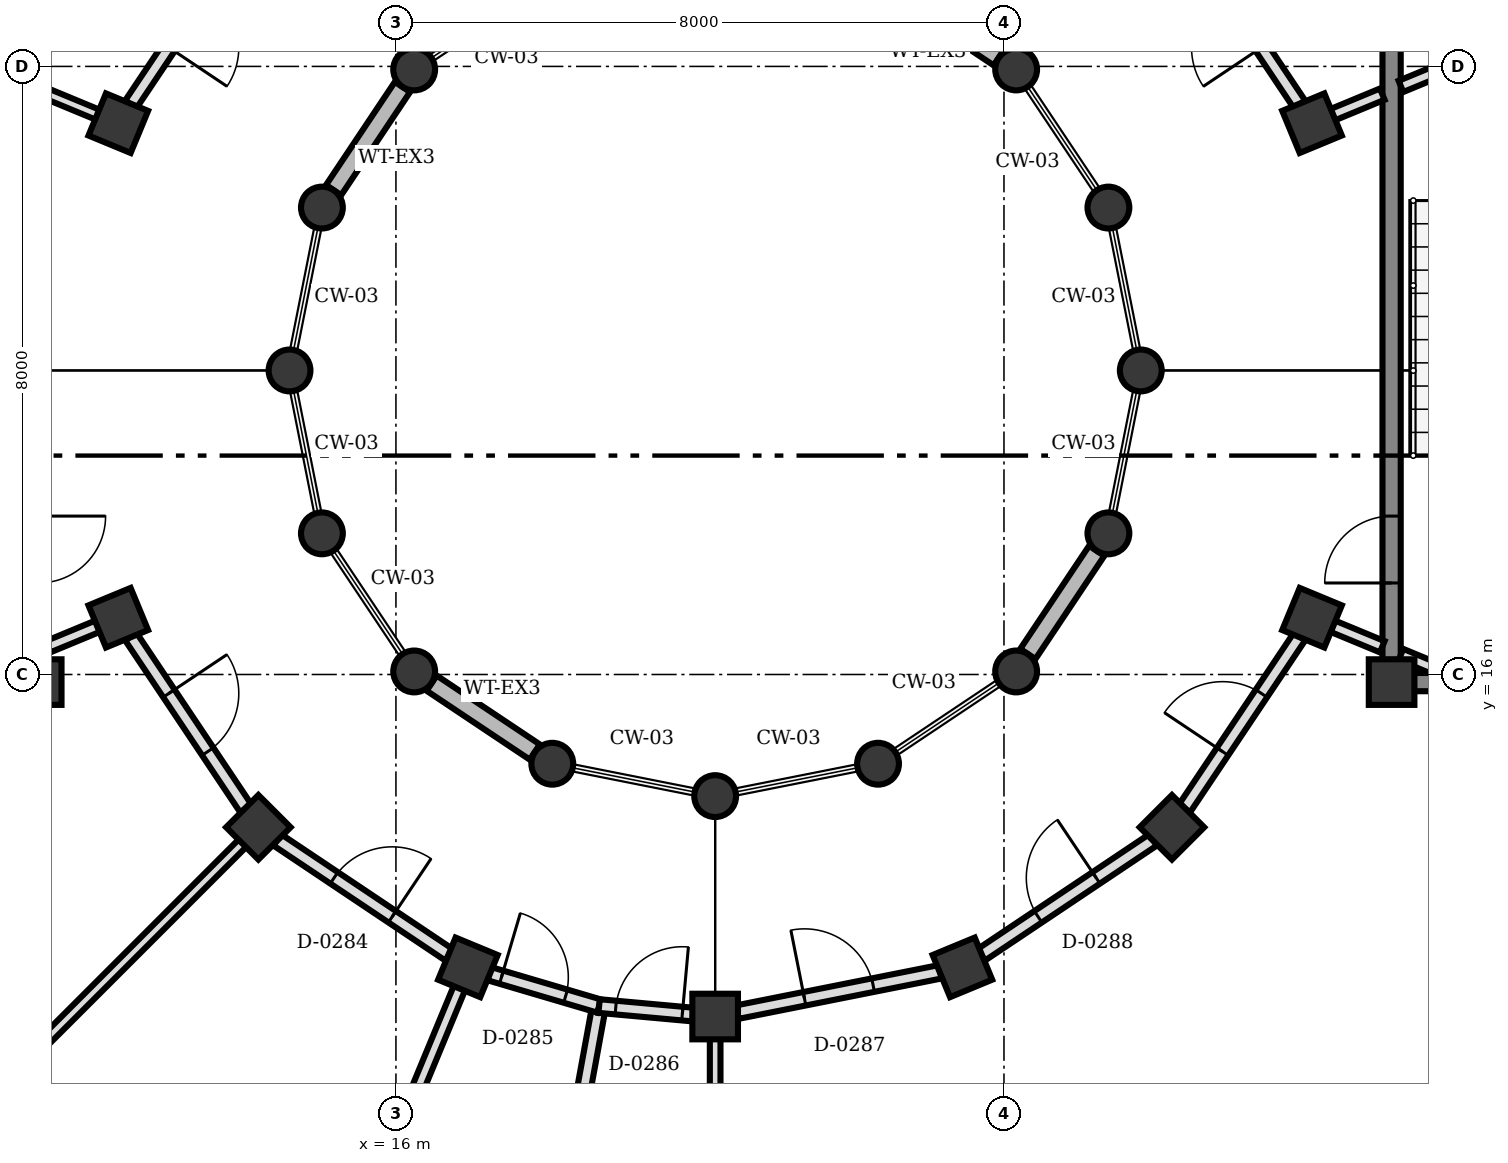
"""IFC4 building model, lengths in metres.
Left out: names, types, materials, properties, quantities, classifications, styles, units other than length and angle.
Written with IfcOpenShell. Run it as: python <this file> out.ifc"""

import sys

from ifc_helpers import new_model, si_unit, direction, frame, frame_2d, origin, origin_2d, place, context, subcontext, project, spatial, rectangle, circle, extrude, element, fill, save


model = new_model("IFC4")
c1 = context("Model", 3, precision=1e-05, world=origin(), true_north=direction((0.0, 1.0)))
c2 = subcontext(c1, "Body", "Model", "MODEL_VIEW")
j1 = project(units=[si_unit("LENGTHUNIT", "METRE"), si_unit("PLANEANGLEUNIT", "RADIAN")], contexts=[c1])
p1 = place(None, origin())
s1 = spatial("IfcSite", under=j1, at=p1, CompositionType="ELEMENT")
p2 = place(p1, origin())
s2 = spatial("IfcBuilding", under=s1, at=p2, CompositionType="ELEMENT")
p3 = place(p2, origin())
s3 = spatial("IfcBuildingStorey", under=s2, at=p3, CompositionType="ELEMENT", Elevation=0.0)
for number, where, z_axis, x_axis in (
    (1, (11.3, 15.9, 0.0), (0.0, 0.0, 1.0), (1.0, 0.0, 0.0)),
    (2, (29.1, 15.9, 0.0), (0.0, 0.0, 1.0), (1.0, 0.0, 0.0)),
):
    element("IfcColumn", number, at=place(p3, frame(where, z_axis=z_axis, x_axis=x_axis)), inside=s3, PredefinedType="COLUMN", context=c2, shape_type="SweptSolid", body=[
        extrude(rectangle(XDim=0.6, YDim=0.6, at=origin_2d()), origin(), (0.0, 0.0, 1.0), 4.5),
    ])
for number, where, z_axis, x_axis in (
    (3, (25.8, 20.0, 0.0), (0.0, 0.0, 1.0), (1.0, 0.0, 0.0)),
    (4, (25.374, 22.143, 0.0), (0.0, 0.0, 1.0), (1.0, 0.0, 0.0)),
    (5, (24.16, 23.96, 0.0), (0.0, 0.0, 1.0), (1.0, 0.0, 0.0)),
    (6, (16.24, 23.96, 0.0), (0.0, 0.0, 1.0), (1.0, 0.0, 0.0)),
    (7, (15.026, 22.143, 0.0), (0.0, 0.0, 1.0), (1.0, 0.0, 0.0)),
    (8, (14.6, 20.0, 0.0), (0.0, 0.0, 1.0), (1.0, 0.0, 0.0)),
    (9, (15.026, 17.857, 0.0), (0.0, 0.0, 1.0), (1.0, 0.0, 0.0)),
    (10, (16.24, 16.04, 0.0), (0.0, 0.0, 1.0), (1.0, 0.0, 0.0)),
    (11, (18.057, 14.826, 0.0), (0.0, 0.0, 1.0), (1.0, 0.0, 0.0)),
    (12, (20.2, 14.4, 0.0), (0.0, 0.0, 1.0), (1.0, 0.0, 0.0)),
    (13, (22.343, 14.826, 0.0), (0.0, 0.0, 1.0), (1.0, 0.0, 0.0)),
    (14, (24.16, 16.04, 0.0), (0.0, 0.0, 1.0), (1.0, 0.0, 0.0)),
    (15, (25.374, 17.857, 0.0), (0.0, 0.0, 1.0), (1.0, 0.0, 0.0)),
):
    element("IfcColumn", number, at=place(p3, frame(where, z_axis=z_axis, x_axis=x_axis)), inside=s3, PredefinedType="COLUMN", context=c2, shape_type="SweptSolid", body=[
        extrude(circle(Radius=0.275, at=origin_2d()), origin(), (0.0, 0.0, 1.0), 4.5),
    ])
for number, where, z_axis, x_axis in (
    (16, (28.053, 23.253, 0.0), (0.0, 0.0, 1.0), (0.924, 0.383, 0.0)),
    (17, (12.347, 23.253, 0.0), (0.0, 0.0, 1.0), (-0.924, 0.383, 0.0)),
    (18, (12.347, 16.747, 0.0), (0.0, 0.0, 1.0), (-0.924, -0.383, 0.0)),
    (19, (14.19, 13.99, 0.0), (0.0, 0.0, 1.0), (-0.707, -0.707, 0.0)),
    (20, (16.947, 12.147, 0.0), (0.0, 0.0, 1.0), (-0.383, -0.924, 0.0)),
    (21, (20.2, 11.5, 0.0), (0.0, 0.0, 1.0), (0.0, -1.0, 0.0)),
    (22, (23.453, 12.147, 0.0), (0.0, 0.0, 1.0), (0.383, -0.924, 0.0)),
    (23, (26.21, 13.99, 0.0), (0.0, 0.0, 1.0), (0.707, -0.707, 0.0)),
    (24, (28.053, 16.747, 0.0), (0.0, 0.0, 1.0), (0.924, -0.383, 0.0)),
):
    element("IfcColumn", number, at=place(p3, frame(where, z_axis=z_axis, x_axis=x_axis)), inside=s3, PredefinedType="COLUMN", context=c2, shape_type="SweptSolid", body=[
        extrude(rectangle(XDim=0.6, YDim=0.6, at=origin_2d()), origin(), (0.0, 0.0, 1.0), 4.5),
    ])
for number, where, z_axis, x_axis in (
    (25, (23.93, 24.114, 0.0), (0.0, 0.0, 1.0), (-0.832, 0.555, 0.0)),
    (26, (16.086, 23.73, 0.0), (0.0, 0.0, 1.0), (-0.555, -0.832, 0.0)),
    (27, (16.47, 15.886, 0.0), (0.0, 0.0, 1.0), (0.832, -0.555, 0.0)),
    (28, (24.314, 16.27, 0.0), (0.0, 0.0, 1.0), (0.555, 0.832, 0.0)),
):
    element("IfcWall", number, at=place(p3, frame(where, z_axis=z_axis, x_axis=x_axis)), inside=s3, PredefinedType="SOLIDWALL", context=c2, shape_type="SweptSolid", body=[
        extrude(rectangle(XDim=1.632, YDim=0.24, at=frame_2d((0.816, 0.0))), origin(), (0.0, 0.0, 1.0), 3.55),
    ])
p4 = place(p3, frame((29.1, 16.192, 0.0), z_axis=(0.0, 0.0, 1.0), x_axis=(0.0, 1.0, 0.0)))
e29 = element("IfcWall", 29, at=p4, inside=s3, PredefinedType="SHEAR", context=c2, shape_type="SweptSolid", body=[
    extrude(rectangle(XDim=8.136, YDim=0.24, at=frame_2d((4.068, 0.0))), origin(), (0.0, 0.0, 1.0), 4.24),
])
p5 = place(p4, frame((1.012, 0.0, 0.0)))
e30 = element("IfcOpeningElement", 30, at=p5, cuts=e29, PredefinedType="OPENING", context=c2, shape_type="SweptSolid", body=[
    extrude(rectangle(XDim=0.88, YDim=2.1, at=frame_2d((0.44, 1.05))), frame((0.0, 0.13, 0.0), z_axis=(0.0, -1.0, 0.0), x_axis=(1.0, 0.0, 0.0)), (0.0, 0.0, 1.0), 0.26),
])
p6 = place(p3, frame((33.608, 15.9, 0.0), z_axis=(0.0, 0.0, 1.0), x_axis=(-1.0, 0.0, 0.0)))
e31 = element("IfcWall", 31, at=p6, inside=s3, PredefinedType="SHEAR", context=c2, shape_type="SweptSolid", body=[
    extrude(rectangle(XDim=4.216, YDim=0.24, at=frame_2d((2.108, 0.0))), origin(), (0.0, 0.0, 1.0), 4.24),
])
p7 = place(p3, frame((28.323, 23.364, 0.0), z_axis=(0.0, 0.0, 1.0), x_axis=(0.923840285319, 0.382778169729, 0.0)))
e32 = element("IfcWall", 32, at=p7, inside=s3, PredefinedType="PARTITIONING", context=c2, shape_type="SweptSolid", body=[
    extrude(rectangle(XDim=0.708, YDim=0.16, at=frame_2d((0.354, 0.0))), origin(), (0.0, 0.0, 1.0), 4.2),
])
p8 = place(p3, frame((29.223, 23.737, 0.0), z_axis=(0.0, 0.0, 1.0), x_axis=(0.923817443679, 0.382833293686, 0.0)))
e33 = element("IfcWall", 33, at=p8, inside=s3, PredefinedType="PARTITIONING", context=c2, shape_type="SweptSolid", body=[
    extrude(rectangle(XDim=1.985, YDim=0.16, at=frame_2d((0.993, 0.0))), origin(), (0.0, 0.0, 1.0), 4.2),
])
p9 = place(p3, frame((12.077, 23.364, 0.0), z_axis=(0.0, 0.0, 1.0), x_axis=(-0.923789734747, 0.382900151445, 0.0)))
e34 = element("IfcWall", 34, at=p9, inside=s3, PredefinedType="PARTITIONING", context=c2, shape_type="SweptSolid", body=[
    extrude(rectangle(XDim=0.708, YDim=0.14, at=frame_2d((0.354, 0.0))), origin(), (0.0, 0.0, 1.0), 4.2),
])
p10 = place(p3, frame((12.077, 16.636, 0.0), z_axis=(0.0, 0.0, 1.0), x_axis=(-0.923789734747, -0.382900151445, 0.0)))
e35 = element("IfcWall", 35, at=p10, inside=s3, PredefinedType="PARTITIONING", context=c2, shape_type="SweptSolid", body=[
    extrude(rectangle(XDim=0.708, YDim=0.16, at=frame_2d((0.354, 0.0))), origin(), (0.0, 0.0, 1.0), 3.552),
])
p11 = place(p3, frame((13.984, 13.784, 0.0), z_axis=(0.0, 0.0, 1.0), x_axis=(-0.707106781187, -0.707106781187, 0.0)))
e36 = element("IfcWall", 36, at=p11, inside=s3, PredefinedType="PARTITIONING", context=c2, shape_type="SweptSolid", body=[
    extrude(rectangle(XDim=8.392, YDim=0.14, at=frame_2d((4.196, 0.0))), origin(), (0.0, 0.0, 1.0), 3.552),
])
p12 = place(p3, frame((16.836, 11.877, 0.0), z_axis=(0.0, 0.0, 1.0), x_axis=(-0.382780060664, -0.923839501839, 0.0)))
e37 = element("IfcWall", 37, at=p12, inside=s3, PredefinedType="PARTITIONING", context=c2, shape_type="SweptSolid", body=[
    extrude(rectangle(XDim=8.391, YDim=0.16, at=frame_2d((4.196, 0.0))), origin(), (0.0, 0.0, 1.0), 3.552),
])
p13 = place(p3, frame((20.2, 11.208, 0.0), z_axis=(0.0, 0.0, 1.0), x_axis=(0.0, -1.0, 0.0)))
e38 = element("IfcWall", 38, at=p13, inside=s3, PredefinedType="PARTITIONING", context=c2, shape_type="SweptSolid", body=[
    extrude(rectangle(XDim=8.391, YDim=0.14, at=frame_2d((4.196, 0.0))), origin(), (0.0, 0.0, 1.0), 3.552),
])
p14 = place(p3, frame((28.323, 16.636, 0.0), z_axis=(0.0, 0.0, 1.0), x_axis=(0.923840285319, -0.382778169729, 0.0)))
e39 = element("IfcWall", 39, at=p14, inside=s3, PredefinedType="PARTITIONING", context=c2, shape_type="SweptSolid", body=[
    extrude(rectangle(XDim=0.708, YDim=0.16, at=frame_2d((0.354, 0.0))), origin(), (0.0, 0.0, 1.0), 3.552),
])
p15 = place(p3, frame((29.223, 16.263, 0.0), z_axis=(0.0, 0.0, 1.0), x_axis=(0.923812676193, -0.382844797933, 0.0)))
e40 = element("IfcWall", 40, at=p15, inside=s3, PredefinedType="PARTITIONING", context=c2, shape_type="SweptSolid", body=[
    extrude(rectangle(XDim=0.627, YDim=0.16, at=frame_2d((0.313, 0.0))), origin(), (0.0, 0.0, 1.0), 3.552),
])
p16 = place(p3, frame((18.673, 11.638, 0.0), z_axis=(0.0, 0.0, 1.0), x_axis=(-0.179734485707, -0.983715159306, 0.0)))
e41 = element("IfcWall", 41, at=p16, inside=s3, PredefinedType="PARTITIONING", context=c2, shape_type="SweptSolid", body=[
    extrude(rectangle(XDim=8.552, YDim=0.18, at=frame_2d((4.276, 0.0))), origin(), (0.0, 0.0, 1.0), 3.552),
])
p17 = place(p3, frame((27.888, 23.501, 0.0), z_axis=(0.0, 0.0, 1.0), x_axis=(-0.556128339679, 0.831096426298, 0.0)))
e42 = element("IfcWall", 42, at=p17, inside=s3, PredefinedType="PARTITIONING", context=c2, shape_type="SweptSolid", body=[
    extrude(rectangle(XDim=2.72, YDim=0.18, at=frame_2d((1.36, 0.0))), origin(), (0.0, 0.0, 1.0), 3.552),
])
p18 = place(p17, frame((0.9, 0.0, 0.0)))
e43 = element("IfcOpeningElement", 43, at=p18, cuts=e42, PredefinedType="OPENING", context=c2, shape_type="SweptSolid", body=[
    extrude(rectangle(XDim=0.92, YDim=2.1, at=frame_2d((0.46, 1.05))), frame((0.0, 0.1, 0.0), z_axis=(0.0, -1.0, 0.0), x_axis=(1.0, 0.0, 0.0)), (0.0, 0.0, 1.0), 0.2),
])
p19 = place(p3, frame((14.025, 25.762, 0.0), z_axis=(0.0, 0.0, 1.0), x_axis=(-0.556128339679, -0.831096426298, 0.0)))
e44 = element("IfcWall", 44, at=p19, inside=s3, PredefinedType="PARTITIONING", context=c2, shape_type="SweptSolid", body=[
    extrude(rectangle(XDim=2.72, YDim=0.18, at=frame_2d((1.36, 0.0))), origin(), (0.0, 0.0, 1.0), 3.552),
])
p20 = place(p19, frame((0.9, 0.0, 0.0)))
e45 = element("IfcOpeningElement", 45, at=p20, cuts=e44, PredefinedType="OPENING", context=c2, shape_type="SweptSolid", body=[
    extrude(rectangle(XDim=0.92, YDim=2.1, at=frame_2d((0.46, 1.05))), frame((0.0, 0.1, 0.0), z_axis=(0.0, -1.0, 0.0), x_axis=(1.0, 0.0, 0.0)), (0.0, 0.0, 1.0), 0.2),
])
p21 = place(p3, frame((12.512, 16.499, 0.0), z_axis=(0.0, 0.0, 1.0), x_axis=(0.556128339679, -0.831096426298, 0.0)))
e46 = element("IfcWall", 46, at=p21, inside=s3, PredefinedType="PARTITIONING", context=c2, shape_type="SweptSolid", body=[
    extrude(rectangle(XDim=2.72, YDim=0.18, at=frame_2d((1.36, 0.0))), origin(), (0.0, 0.0, 1.0), 3.552),
])
p22 = place(p21, frame((0.9, 0.0, 0.0)))
e47 = element("IfcOpeningElement", 47, at=p22, cuts=e46, PredefinedType="OPENING", context=c2, shape_type="SweptSolid", body=[
    extrude(rectangle(XDim=0.92, YDim=2.1, at=frame_2d((0.46, 1.05))), frame((0.0, 0.1, 0.0), z_axis=(0.0, -1.0, 0.0), x_axis=(1.0, 0.0, 0.0)), (0.0, 0.0, 1.0), 0.2),
])
p23 = place(p3, frame((14.438, 13.825, 0.0), z_axis=(0.0, 0.0, 1.0), x_axis=(0.831096426298, -0.556128339679, 0.0)))
e48 = element("IfcWall", 48, at=p23, inside=s3, PredefinedType="PARTITIONING", context=c2, shape_type="SweptSolid", body=[
    extrude(rectangle(XDim=2.72, YDim=0.18, at=frame_2d((1.36, 0.0))), origin(), (0.0, 0.0, 1.0), 3.552),
])
p24 = place(p23, frame((0.9, 0.0, 0.0)))
e49 = element("IfcOpeningElement", 49, at=p24, cuts=e48, PredefinedType="OPENING", context=c2, shape_type="SweptSolid", body=[
    extrude(rectangle(XDim=0.92, YDim=2.1, at=frame_2d((0.46, 1.05))), frame((0.0, 0.1, 0.0), z_axis=(0.0, -1.0, 0.0), x_axis=(1.0, 0.0, 0.0)), (0.0, 0.0, 1.0), 0.2),
])
p25 = place(p3, frame((17.229, 12.064, 0.0), z_axis=(0.0, 0.0, 1.0), x_axis=(0.959132791877, -0.282956335051, 0.0)))
e50 = element("IfcWall", 50, at=p25, inside=s3, PredefinedType="PARTITIONING", context=c2, shape_type="SweptSolid", body=[
    extrude(rectangle(XDim=1.506, YDim=0.18, at=frame_2d((0.753, 0.0))), origin(), (0.0, 0.0, 1.0), 3.552),
])
p26 = place(p25, frame((0.166, 0.0, 0.0)))
e51 = element("IfcOpeningElement", 51, at=p26, cuts=e50, PredefinedType="OPENING", context=c2, shape_type="SweptSolid", body=[
    extrude(rectangle(XDim=0.88, YDim=2.1, at=frame_2d((0.44, 1.05))), frame((0.0, 0.1, 0.0), z_axis=(0.0, -1.0, 0.0), x_axis=(1.0, 0.0, 0.0)), (0.0, 0.0, 1.0), 0.2),
])
p27 = place(p3, frame((18.673, 11.638, 0.0), z_axis=(0.0, 0.0, 1.0), x_axis=(0.995907718878, -0.090375967372, 0.0)))
e52 = element("IfcWall", 52, at=p27, inside=s3, PredefinedType="PARTITIONING", context=c2, shape_type="SweptSolid", body=[
    extrude(rectangle(XDim=1.24, YDim=0.18, at=frame_2d((0.62, 0.0))), origin(), (0.0, 0.0, 1.0), 3.552),
])
p28 = place(p27, frame((0.22, 0.0, 0.0)))
e53 = element("IfcOpeningElement", 53, at=p28, cuts=e52, PredefinedType="OPENING", context=c2, shape_type="SweptSolid", body=[
    extrude(rectangle(XDim=0.88, YDim=2.1, at=frame_2d((0.44, 1.05))), frame((0.0, 0.1, 0.0), z_axis=(0.0, -1.0, 0.0), x_axis=(1.0, 0.0, 0.0)), (0.0, 0.0, 1.0), 0.2),
])
p29 = place(p3, frame((20.492, 11.558, 0.0), z_axis=(0.0, 0.0, 1.0), x_axis=(0.980776867939, 0.195132609565, 0.0)))
e54 = element("IfcWall", 54, at=p29, inside=s3, PredefinedType="PARTITIONING", context=c2, shape_type="SweptSolid", body=[
    extrude(rectangle(XDim=2.721, YDim=0.18, at=frame_2d((1.361, 0.0))), origin(), (0.0, 0.0, 1.0), 3.552),
])
p30 = place(p29, frame((0.901, 0.0, 0.0)))
e55 = element("IfcOpeningElement", 55, at=p30, cuts=e54, PredefinedType="OPENING", context=c2, shape_type="SweptSolid", body=[
    extrude(rectangle(XDim=0.92, YDim=2.1, at=frame_2d((0.46, 1.05))), frame((0.0, 0.1, 0.0), z_axis=(0.0, -1.0, 0.0), x_axis=(1.0, 0.0, 0.0)), (0.0, 0.0, 1.0), 0.2),
])
p31 = place(p3, frame((23.701, 12.312, 0.0), z_axis=(0.0, 0.0, 1.0), x_axis=(0.831096426298, 0.556128339679, 0.0)))
e56 = element("IfcWall", 56, at=p31, inside=s3, PredefinedType="PARTITIONING", context=c2, shape_type="SweptSolid", body=[
    extrude(rectangle(XDim=2.72, YDim=0.18, at=frame_2d((1.36, 0.0))), origin(), (0.0, 0.0, 1.0), 3.552),
])
p32 = place(p31, frame((0.9, 0.0, 0.0)))
e57 = element("IfcOpeningElement", 57, at=p32, cuts=e56, PredefinedType="OPENING", context=c2, shape_type="SweptSolid", body=[
    extrude(rectangle(XDim=0.92, YDim=2.1, at=frame_2d((0.46, 1.05))), frame((0.0, 0.1, 0.0), z_axis=(0.0, -1.0, 0.0), x_axis=(1.0, 0.0, 0.0)), (0.0, 0.0, 1.0), 0.2),
])
p33 = place(p3, frame((26.375, 14.238, 0.0), z_axis=(0.0, 0.0, 1.0), x_axis=(0.556128339679, 0.831096426298, 0.0)))
e58 = element("IfcWall", 58, at=p33, inside=s3, PredefinedType="PARTITIONING", context=c2, shape_type="SweptSolid", body=[
    extrude(rectangle(XDim=2.72, YDim=0.18, at=frame_2d((1.36, 0.0))), origin(), (0.0, 0.0, 1.0), 3.552),
])
p34 = place(p33, frame((0.9, 0.0, 0.0)))
e59 = element("IfcOpeningElement", 59, at=p34, cuts=e58, PredefinedType="OPENING", context=c2, shape_type="SweptSolid", body=[
    extrude(rectangle(XDim=0.92, YDim=2.1, at=frame_2d((0.46, 1.05))), frame((0.0, 0.1, 0.0), z_axis=(0.0, -1.0, 0.0), x_axis=(1.0, 0.0, 0.0)), (0.0, 0.0, 1.0), 0.2),
])
p35 = place(p5, origin())
e60 = element("IfcDoor", 60, at=p35, inside=s3, OperationType="SINGLE_SWING_LEFT", PredefinedType="DOOR", context=c2, shape_type="SweptSolid", body=[
    extrude(rectangle(XDim=0.88, YDim=2.1, at=frame_2d((0.44, 1.05))), frame((0.0, 0.025, 0.0), z_axis=(0.0, -1.0, 0.0), x_axis=(1.0, 0.0, 0.0)), (0.0, 0.0, 1.0), 0.05),
])
fill(e30, e60)
p36 = place(p22, origin())
e61 = element("IfcDoor", 61, at=p36, inside=s3, OperationType="SINGLE_SWING_LEFT", PredefinedType="DOOR", context=c2, shape_type="SweptSolid", body=[
    extrude(rectangle(XDim=0.92, YDim=2.1, at=frame_2d((0.46, 1.05))), frame((0.0, 0.025, 0.0), z_axis=(0.0, -1.0, 0.0), x_axis=(1.0, 0.0, 0.0)), (0.0, 0.0, 1.0), 0.05),
])
fill(e47, e61)
p37 = place(p24, origin())
e62 = element("IfcDoor", 62, at=p37, inside=s3, OperationType="SINGLE_SWING_RIGHT", PredefinedType="DOOR", context=c2, shape_type="SweptSolid", body=[
    extrude(rectangle(XDim=0.92, YDim=2.1, at=frame_2d((0.46, 1.05))), frame((0.0, 0.025, 0.0), z_axis=(0.0, -1.0, 0.0), x_axis=(1.0, 0.0, 0.0)), (0.0, 0.0, 1.0), 0.05),
])
fill(e49, e62)
p38 = place(p26, origin())
e63 = element("IfcDoor", 63, at=p38, inside=s3, OperationType="SINGLE_SWING_LEFT", PredefinedType="DOOR", context=c2, shape_type="SweptSolid", body=[
    extrude(rectangle(XDim=0.88, YDim=2.1, at=frame_2d((0.44, 1.05))), frame((0.0, 0.025, 0.0), z_axis=(0.0, -1.0, 0.0), x_axis=(1.0, 0.0, 0.0)), (0.0, 0.0, 1.0), 0.05),
])
fill(e51, e63)
p39 = place(p28, origin())
e64 = element("IfcDoor", 64, at=p39, inside=s3, OperationType="SINGLE_SWING_RIGHT", PredefinedType="DOOR", context=c2, shape_type="SweptSolid", body=[
    extrude(rectangle(XDim=0.88, YDim=2.1, at=frame_2d((0.44, 1.05))), frame((0.0, 0.025, 0.0), z_axis=(0.0, -1.0, 0.0), x_axis=(1.0, 0.0, 0.0)), (0.0, 0.0, 1.0), 0.05),
])
fill(e53, e64)
p40 = place(p30, origin())
e65 = element("IfcDoor", 65, at=p40, inside=s3, OperationType="SINGLE_SWING_LEFT", PredefinedType="DOOR", context=c2, shape_type="SweptSolid", body=[
    extrude(rectangle(XDim=0.92, YDim=2.1, at=frame_2d((0.46, 1.05))), frame((0.0, 0.025, 0.0), z_axis=(0.0, -1.0, 0.0), x_axis=(1.0, 0.0, 0.0)), (0.0, 0.0, 1.0), 0.05),
])
fill(e55, e65)
p41 = place(p32, origin())
e66 = element("IfcDoor", 66, at=p41, inside=s3, OperationType="SINGLE_SWING_RIGHT", PredefinedType="DOOR", context=c2, shape_type="SweptSolid", body=[
    extrude(rectangle(XDim=0.92, YDim=2.1, at=frame_2d((0.46, 1.05))), frame((0.0, 0.025, 0.0), z_axis=(0.0, -1.0, 0.0), x_axis=(1.0, 0.0, 0.0)), (0.0, 0.0, 1.0), 0.05),
])
fill(e57, e66)
p42 = place(p34, origin())
e67 = element("IfcDoor", 67, at=p42, inside=s3, OperationType="SINGLE_SWING_LEFT", PredefinedType="DOOR", context=c2, shape_type="SweptSolid", body=[
    extrude(rectangle(XDim=0.92, YDim=2.1, at=frame_2d((0.46, 1.05))), frame((0.0, 0.025, 0.0), z_axis=(0.0, -1.0, 0.0), x_axis=(1.0, 0.0, 0.0)), (0.0, 0.0, 1.0), 0.05),
])
fill(e59, e67)
save(model, sys.argv[1])
